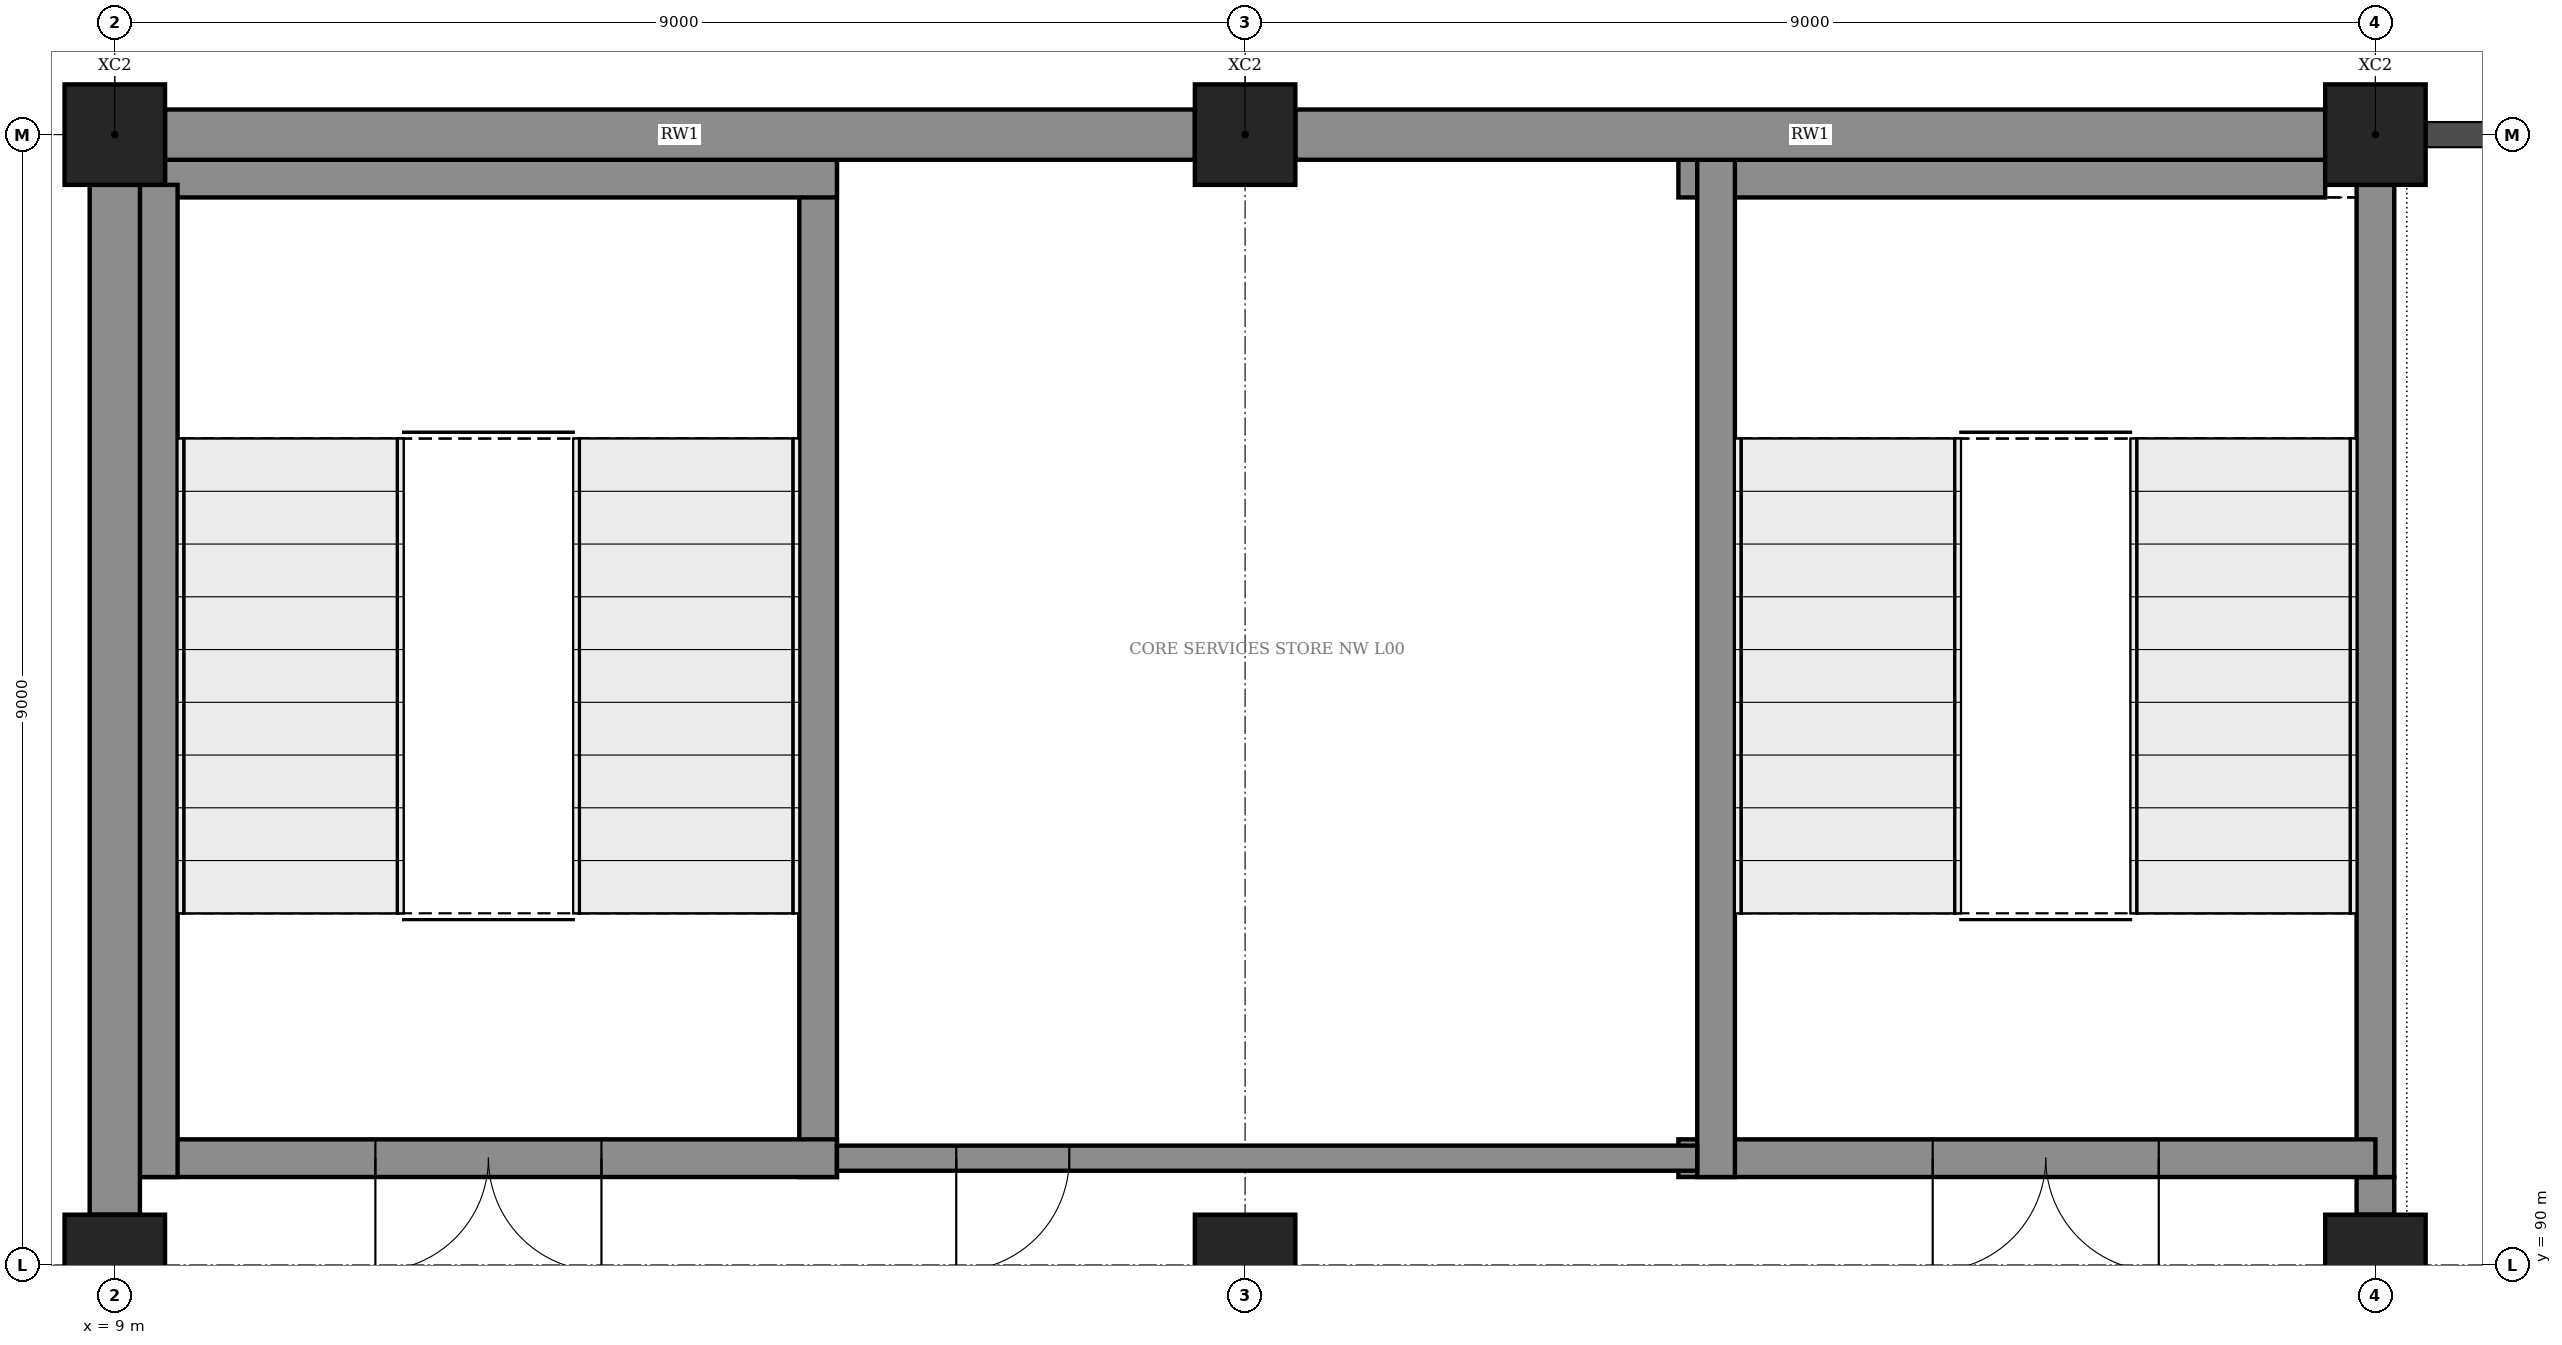
"""IFC4 building model, lengths in metres.
Left out: names, types, materials, properties, quantities, classifications, styles, units other than length and angle.
Written with IfcOpenShell. Run it as: python <this file> out.ifc"""

import sys

from ifc_helpers import new_model, si_unit, direction, frame, frame_2d, origin, origin_2d, place, context, subcontext, project, spatial, rectangle, extrude, element, fill, save


model = new_model("IFC4")
c1 = context("Model", 3, precision=1e-05, world=origin(), true_north=direction((0.0, 1.0)))
c2 = subcontext(c1, "Body", "Model", "MODEL_VIEW")
j1 = project(units=[si_unit("LENGTHUNIT", "METRE"), si_unit("PLANEANGLEUNIT", "RADIAN")], contexts=[c1])
p1 = place(None, origin())
s1 = spatial("IfcSite", under=j1, at=p1, CompositionType="ELEMENT")
p2 = place(p1, origin())
s2 = spatial("IfcBuilding", under=s1, at=p2, CompositionType="ELEMENT")
p3 = place(p2, origin())
s3 = spatial("IfcBuildingStorey", under=s2, at=p3, CompositionType="ELEMENT", Elevation=0.0)
for number, where, z_axis, x_axis in (
    (1, (9.0, 90.0, -0.3), (0.0, 0.0, 1.0), (1.0, 0.0, 0.0)),
    (2, (9.0, 99.0, -0.3), (0.0, 0.0, 1.0), (1.0, 0.0, 0.0)),
    (3, (18.0, 90.0, -0.3), (0.0, 0.0, 1.0), (1.0, 0.0, 0.0)),
    (4, (18.0, 99.0, -0.3), (0.0, 0.0, 1.0), (1.0, 0.0, 0.0)),
    (5, (27.0, 90.0, -0.3), (0.0, 0.0, 1.0), (1.0, 0.0, 0.0)),
    (6, (27.0, 99.0, -0.3), (0.0, 0.0, 1.0), (1.0, 0.0, 0.0)),
):
    element("IfcColumn", number, at=place(p3, frame(where, z_axis=z_axis, x_axis=x_axis)), inside=s3, PredefinedType="COLUMN", context=c2, shape_type="SweptSolid", body=[
        extrude(rectangle(XDim=0.8, YDim=0.8, at=origin_2d()), origin(), (0.0, 0.0, 1.0), 6.3),
    ])
for number, where, z_axis, x_axis in (
    (7, (9.4, 99.0, 0.0), (0.0, 0.0, 1.0), (1.0, 0.0, 0.0)),
    (8, (18.4, 99.0, 0.0), (0.0, 0.0, 1.0), (1.0, 0.0, 0.0)),
    (9, (9.0, 90.4, 0.0), (0.0, 0.0, 1.0), (0.0, 1.0, 0.0)),
):
    element("IfcWall", number, at=place(p3, frame(where, z_axis=z_axis, x_axis=x_axis)), inside=s3, PredefinedType="SOLIDWALL", context=c2, shape_type="SweptSolid", body=[
        extrude(rectangle(XDim=8.2, YDim=0.4, at=frame_2d((4.1, 0.0))), origin(), (0.0, 0.0, 1.0), 4.82),
    ])
p4 = place(p3, frame((9.4, 98.65, 0.0), z_axis=(0.0, 0.0, 1.0), x_axis=(1.0, 0.0, 0.0)))
e10 = element("IfcWall", 10, at=p4, inside=s3, PredefinedType="SOLIDWALL", context=c2, shape_type="SweptSolid", body=[
    extrude(rectangle(XDim=5.35, YDim=0.3, at=frame_2d((2.675, 0.0))), origin(), (0.0, 0.0, 1.0), 5.72),
])
p5 = place(p3, frame((9.2, 90.85, 0.0), z_axis=(0.0, 0.0, 1.0), x_axis=(1.0, 0.0, 0.0)))
e11 = element("IfcWall", 11, at=p5, inside=s3, PredefinedType="SOLIDWALL", context=c2, shape_type="SweptSolid", body=[
    extrude(rectangle(XDim=5.55, YDim=0.3, at=frame_2d((2.775, 0.0))), origin(), (0.0, 0.0, 1.0), 5.72),
])
p6 = place(p5, frame((1.875, 0.0, 0.0)))
e12 = element("IfcOpeningElement", 12, at=p6, cuts=e11, PredefinedType="OPENING", context=c2, shape_type="SweptSolid", body=[
    extrude(rectangle(XDim=1.8, YDim=2.4, at=frame_2d((0.9, 1.2))), frame((0.0, 0.16, 0.0), z_axis=(0.0, -1.0, 0.0), x_axis=(1.0, 0.0, 0.0)), (0.0, 0.0, 1.0), 0.32),
])
p7 = place(p3, frame((9.35, 98.6, 0.0), z_axis=(0.0, 0.0, 1.0), x_axis=(0.0, -1.0, 0.0)))
e13 = element("IfcWall", 13, at=p7, inside=s3, PredefinedType="SOLIDWALL", context=c2, shape_type="SweptSolid", body=[
    extrude(rectangle(XDim=7.9, YDim=0.3, at=frame_2d((3.95, 0.0))), origin(), (0.0, 0.0, 1.0), 5.72),
])
p8 = place(p3, frame((14.6, 98.8, 0.0), z_axis=(0.0, 0.0, 1.0), x_axis=(0.0, -1.0, 0.0)))
e14 = element("IfcWall", 14, at=p8, inside=s3, PredefinedType="SOLIDWALL", context=c2, shape_type="SweptSolid", body=[
    extrude(rectangle(XDim=8.1, YDim=0.3, at=frame_2d((4.05, 0.0))), origin(), (0.0, 0.0, 1.0), 5.72),
])
p9 = place(p3, frame((21.45, 98.65, 0.0), z_axis=(0.0, 0.0, 1.0), x_axis=(1.0, 0.0, 0.0)))
e15 = element("IfcWall", 15, at=p9, inside=s3, PredefinedType="SOLIDWALL", context=c2, shape_type="SweptSolid", body=[
    extrude(rectangle(XDim=5.15, YDim=0.3, at=frame_2d((2.575, 0.0))), origin(), (0.0, 0.0, 1.0), 5.72),
])
p10 = place(p3, frame((21.45, 90.85, 0.0), z_axis=(0.0, 0.0, 1.0), x_axis=(1.0, 0.0, 0.0)))
e16 = element("IfcWall", 16, at=p10, inside=s3, PredefinedType="SOLIDWALL", context=c2, shape_type="SweptSolid", body=[
    extrude(rectangle(XDim=5.55, YDim=0.3, at=frame_2d((2.775, 0.0))), origin(), (0.0, 0.0, 1.0), 5.72),
])
p11 = place(p10, frame((2.025, 0.0, 0.0)))
e17 = element("IfcOpeningElement", 17, at=p11, cuts=e16, PredefinedType="OPENING", context=c2, shape_type="SweptSolid", body=[
    extrude(rectangle(XDim=1.8, YDim=2.4, at=frame_2d((0.9, 1.2))), frame((0.0, 0.16, 0.0), z_axis=(0.0, -1.0, 0.0), x_axis=(1.0, 0.0, 0.0)), (0.0, 0.0, 1.0), 0.32),
])
p12 = place(p3, frame((21.75, 98.8, 0.0), z_axis=(0.0, 0.0, 1.0), x_axis=(0.0, -1.0, 0.0)))
e18 = element("IfcWall", 18, at=p12, inside=s3, PredefinedType="SOLIDWALL", context=c2, shape_type="SweptSolid", body=[
    extrude(rectangle(XDim=8.1, YDim=0.3, at=frame_2d((4.05, 0.0))), origin(), (0.0, 0.0, 1.0), 5.72),
])
p13 = place(p3, frame((27.0, 98.6, 0.0), z_axis=(0.0, 0.0, 1.0), x_axis=(0.0, -1.0, 0.0)))
e19 = element("IfcWall", 19, at=p13, inside=s3, PredefinedType="SOLIDWALL", context=c2, shape_type="SweptSolid", body=[
    extrude(rectangle(XDim=7.9, YDim=0.3, at=frame_2d((3.95, 0.0))), origin(), (0.0, 0.0, 1.0), 5.72),
])
p14 = place(p3, frame((14.75, 90.85, 0.0), z_axis=(0.0, 0.0, 1.0), x_axis=(1.0, 0.0, 0.0)))
e20 = element("IfcWall", 20, at=p14, inside=s3, PredefinedType="PARTITIONING", context=c2, shape_type="SweptSolid", body=[
    extrude(rectangle(XDim=6.85, YDim=0.2, at=frame_2d((3.425, 0.0))), origin(), (0.0, 0.0, 1.0), 5.72),
])
p15 = place(p14, frame((0.95, 0.0, 0.0)))
e21 = element("IfcOpeningElement", 21, at=p15, cuts=e20, PredefinedType="OPENING", context=c2, shape_type="SweptSolid", body=[
    extrude(rectangle(XDim=0.9, YDim=2.1, at=frame_2d((0.45, 1.05))), frame((0.0, 0.11, 0.0), z_axis=(0.0, -1.0, 0.0), x_axis=(1.0, 0.0, 0.0)), (0.0, 0.0, 1.0), 0.22),
])
p16 = place(p3, frame((27.0, 90.7, 0.0), z_axis=(0.0, 0.0, 1.0), x_axis=(0.0, -1.0, 0.0)))
e22 = element("IfcWall", 22, at=p16, inside=s3, PredefinedType="SOLIDWALL", context=c2, shape_type="SweptSolid", body=[
    extrude(rectangle(XDim=0.3, YDim=0.3, at=frame_2d((0.15, 0.0))), origin(), (0.0, 0.0, 1.0), 4.82),
])
p17 = place(p6, frame((1.8, 0.0, 0.0), z_axis=(0.0, 0.0, 1.0), x_axis=(-1.0, 0.0, 0.0)))
e23 = element("IfcDoor", 23, at=p17, inside=s3, OperationType="DOUBLE_DOOR_SINGLE_SWING", PredefinedType="DOOR", context=c2, shape_type="SweptSolid", body=[
    extrude(rectangle(XDim=1.8, YDim=2.4, at=frame_2d((0.9, 1.2))), frame((0.0, 0.025, 0.0), z_axis=(0.0, -1.0, 0.0), x_axis=(1.0, 0.0, 0.0)), (0.0, 0.0, 1.0), 0.05),
])
fill(e12, e23)
p18 = place(p11, frame((1.8, 0.0, 0.0), z_axis=(0.0, 0.0, 1.0), x_axis=(-1.0, 0.0, 0.0)))
e24 = element("IfcDoor", 24, at=p18, inside=s3, OperationType="DOUBLE_DOOR_SINGLE_SWING", PredefinedType="DOOR", context=c2, shape_type="SweptSolid", body=[
    extrude(rectangle(XDim=1.8, YDim=2.4, at=frame_2d((0.9, 1.2))), frame((0.0, 0.025, 0.0), z_axis=(0.0, -1.0, 0.0), x_axis=(1.0, 0.0, 0.0)), (0.0, 0.0, 1.0), 0.05),
])
fill(e17, e24)
p19 = place(p15, frame((0.9, 0.0, 0.0), z_axis=(0.0, 0.0, 1.0), x_axis=(-1.0, 0.0, 0.0)))
e25 = element("IfcDoor", 25, at=p19, inside=s3, OperationType="SINGLE_SWING_LEFT", PredefinedType="DOOR", context=c2, shape_type="SweptSolid", body=[
    extrude(rectangle(XDim=0.9, YDim=2.1, at=frame_2d((0.45, 1.05))), frame((0.0, 0.025, 0.0), z_axis=(0.0, -1.0, 0.0), x_axis=(1.0, 0.0, 0.0)), (0.0, 0.0, 1.0), 0.05),
])
fill(e21, e25)
save(model, sys.argv[1])
